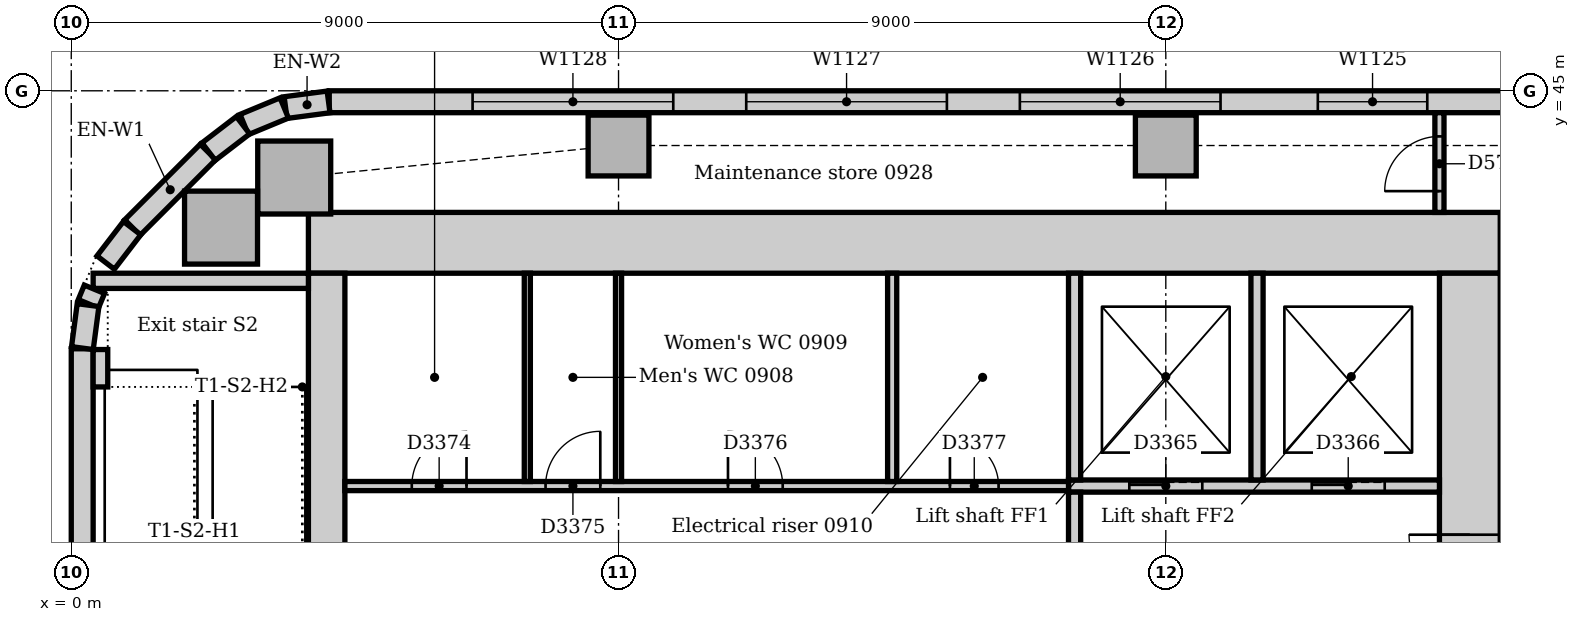
"""IFC4 building model, lengths in metres.
Left out: names, types, materials, properties, quantities, classifications, styles, units other than length and angle.
Written with IfcOpenShell. Run it as: python <this file> out.ifc"""

import sys

from ifc_helpers import new_model, si_unit, direction, frame, frame_2d, origin, origin_2d, place, context, subcontext, project, spatial, rectangle, extrude, element, fill, save


model = new_model("IFC4")
c1 = context("Model", 3, precision=1e-05, world=origin(), true_north=direction((0.0, 1.0)))
c2 = subcontext(c1, "Body", "Model", "MODEL_VIEW")
j1 = project(units=[si_unit("LENGTHUNIT", "METRE"), si_unit("PLANEANGLEUNIT", "RADIAN")], contexts=[c1])
p1 = place(None, origin())
s1 = spatial("IfcSite", under=j1, at=p1, CompositionType="ELEMENT")
p2 = place(p1, origin())
s2 = spatial("IfcBuilding", under=s1, at=p2, CompositionType="ELEMENT")
p3 = place(p2, frame((0.0, 0.0, 42.0)))
s3 = spatial("IfcBuildingStorey", under=s2, at=p3, CompositionType="ELEMENT", Elevation=42.0)
p4 = place(p3, frame((23.5, 42.5, 0.0), z_axis=(0.0, 0.0, 1.0), x_axis=(-1.0, 0.0, 0.0)))
e1 = element("IfcWall", 1, at=p4, inside=s3, PredefinedType="SOLIDWALL", context=c2, shape_type="SweptSolid", body=[
    extrude(rectangle(XDim=19.6, YDim=1.0, at=frame_2d((9.8, 0.0))), origin(), (0.0, 0.0, 1.0), 4.0),
])
p5 = place(p3, frame((23.0, 31.5, 0.0), z_axis=(0.0, 0.0, 1.0), x_axis=(0.0, 1.0, 0.0)))
e2 = element("IfcWall", 2, at=p5, inside=s3, PredefinedType="SOLIDWALL", context=c2, shape_type="SweptSolid", body=[
    extrude(rectangle(XDim=10.5, YDim=1.0, at=frame_2d((5.25, 0.0))), origin(), (0.0, 0.0, 1.0), 4.0),
])
p6 = place(p5, frame((3.15, 0.0, 0.0)))
e3 = element("IfcOpeningElement", 3, at=p6, cuts=e2, PredefinedType="OPENING", context=c2, shape_type="SweptSolid", body=[
    extrude(rectangle(XDim=1.0, YDim=2.1, at=frame_2d((0.5, 1.05))), frame((0.0, 0.51, 0.0), z_axis=(0.0, -1.0, 0.0), x_axis=(1.0, 0.0, 0.0)), (0.0, 0.0, 1.0), 1.02),
])
p7 = place(p5, frame((5.2, 0.0, 0.0)))
e4 = element("IfcOpeningElement", 4, at=p7, cuts=e2, PredefinedType="OPENING", context=c2, shape_type="SweptSolid", body=[
    extrude(rectangle(XDim=1.0, YDim=2.1, at=frame_2d((0.5, 1.05))), frame((0.0, 0.51, 0.0), z_axis=(0.0, -1.0, 0.0), x_axis=(1.0, 0.0, 0.0)), (0.0, 0.0, 1.0), 1.02),
])
p8 = place(p3, frame((4.2, 42.0, 0.0), z_axis=(0.0, 0.0, 1.0), x_axis=(0.0, -1.0, 0.0)))
e5 = element("IfcWall", 5, at=p8, inside=s3, PredefinedType="SOLIDWALL", context=c2, shape_type="SweptSolid", body=[
    extrude(rectangle(XDim=10.5, YDim=0.6, at=frame_2d((5.25, 0.0))), origin(), (0.0, 0.0, 1.0), 4.0),
])
p9 = place(p8, frame((5.3, 0.0, 0.0)))
e6 = element("IfcOpeningElement", 6, at=p9, cuts=e5, PredefinedType="OPENING", context=c2, shape_type="SweptSolid", body=[
    extrude(rectangle(XDim=1.0, YDim=2.1, at=frame_2d((0.5, 1.05))), frame((0.0, 0.31, 0.0), z_axis=(0.0, -1.0, 0.0), x_axis=(1.0, 0.0, 0.0)), (0.0, 0.0, 1.0), 0.62),
])
p10 = place(p3, frame((3.9, 41.875, 0.0), z_axis=(0.0, 0.0, 1.0), x_axis=(-1.0, 0.0, 0.0)))
e7 = element("IfcWall", 7, at=p10, inside=s3, PredefinedType="SOLIDWALL", context=c2, shape_type="SweptSolid", body=[
    extrude(rectangle(XDim=3.54, YDim=0.25, at=frame_2d((1.77, 0.0))), origin(), (0.0, 0.0, 1.0), 4.0),
])
for number, where, z_axis, x_axis in (
    (8, (3.667, 43.574, 0.0), (0.0, 0.0, 1.0), (1.0, 0.0, 0.0)),
    (9, (2.463, 42.75, 0.0), (0.0, 0.0, 1.0), (1.0, 0.0, 0.0)),
):
    element("IfcColumn", number, at=place(p3, frame(where, z_axis=z_axis, x_axis=x_axis)), inside=s3, PredefinedType="COLUMN", context=c2, shape_type="SweptSolid", body=[
        extrude(rectangle(XDim=1.2, YDim=1.2, at=origin_2d()), origin(), (0.0, 0.0, 1.0), 3.7),
    ])
for number, where, z_axis, x_axis in (
    (10, (9.0, 44.1, 0.0), (0.0, 0.0, 1.0), (1.0, 0.0, 0.0)),
    (11, (18.0, 44.1, 0.0), (0.0, 0.0, 1.0), (1.0, 0.0, 0.0)),
):
    element("IfcColumn", number, at=place(p3, frame(where, z_axis=z_axis, x_axis=x_axis)), inside=s3, PredefinedType="COLUMN", context=c2, shape_type="SweptSolid", body=[
        extrude(rectangle(XDim=1.0, YDim=1.0, at=origin_2d()), origin(), (0.0, 0.0, 1.0), 3.7),
    ])
p11 = place(p3, frame((48.257, 44.82, 0.0), z_axis=(0.0, 0.0, 1.0), x_axis=(-1.0, 0.0, 0.0)))
e12 = element("IfcWall", 12, at=p11, inside=s3, PredefinedType="STANDARD", context=c2, shape_type="SweptSolid", body=[
    extrude(rectangle(XDim=44.015, YDim=0.36, at=frame_2d((22.007, 0.0))), origin(), (0.0, 0.0, 1.0), 3.7),
])
p12 = place(p11, frame((2.057, 0.0, 0.9)))
e13 = element("IfcOpeningElement", 13, at=p12, cuts=e12, PredefinedType="OPENING", context=c2, shape_type="SweptSolid", body=[
    extrude(rectangle(XDim=3.3, YDim=1.6, at=frame_2d((1.65, 0.8))), frame((0.0, 0.19, 0.0), z_axis=(0.0, -1.0, 0.0), x_axis=(1.0, 0.0, 0.0)), (0.0, 0.0, 1.0), 0.38),
])
p13 = place(p11, frame((6.857, 0.0, 0.9)))
e14 = element("IfcOpeningElement", 14, at=p13, cuts=e12, PredefinedType="OPENING", context=c2, shape_type="SweptSolid", body=[
    extrude(rectangle(XDim=3.3, YDim=1.6, at=frame_2d((1.65, 0.8))), frame((0.0, 0.19, 0.0), z_axis=(0.0, -1.0, 0.0), x_axis=(1.0, 0.0, 0.0)), (0.0, 0.0, 1.0), 0.38),
])
p14 = place(p11, frame((11.357, 0.0, 0.9)))
e15 = element("IfcOpeningElement", 15, at=p14, cuts=e12, PredefinedType="OPENING", context=c2, shape_type="SweptSolid", body=[
    extrude(rectangle(XDim=3.3, YDim=1.6, at=frame_2d((1.65, 0.8))), frame((0.0, 0.19, 0.0), z_axis=(0.0, -1.0, 0.0), x_axis=(1.0, 0.0, 0.0)), (0.0, 0.0, 1.0), 0.38),
])
p15 = place(p11, frame((15.857, 0.0, 0.9)))
e16 = element("IfcOpeningElement", 16, at=p15, cuts=e12, PredefinedType="OPENING", context=c2, shape_type="SweptSolid", body=[
    extrude(rectangle(XDim=3.3, YDim=1.6, at=frame_2d((1.65, 0.8))), frame((0.0, 0.19, 0.0), z_axis=(0.0, -1.0, 0.0), x_axis=(1.0, 0.0, 0.0)), (0.0, 0.0, 1.0), 0.38),
])
p16 = place(p11, frame((20.357, 0.0, 0.9)))
e17 = element("IfcOpeningElement", 17, at=p16, cuts=e12, PredefinedType="OPENING", context=c2, shape_type="SweptSolid", body=[
    extrude(rectangle(XDim=3.3, YDim=1.6, at=frame_2d((1.65, 0.8))), frame((0.0, 0.19, 0.0), z_axis=(0.0, -1.0, 0.0), x_axis=(1.0, 0.0, 0.0)), (0.0, 0.0, 1.0), 0.38),
])
p17 = place(p11, frame((25.957, 0.0, 0.9)))
e18 = element("IfcOpeningElement", 18, at=p17, cuts=e12, PredefinedType="OPENING", context=c2, shape_type="SweptSolid", body=[
    extrude(rectangle(XDim=1.8, YDim=1.6, at=frame_2d((0.9, 0.8))), frame((0.0, 0.19, 0.0), z_axis=(0.0, -1.0, 0.0), x_axis=(1.0, 0.0, 0.0)), (0.0, 0.0, 1.0), 0.38),
])
p18 = place(p11, frame((29.357, 0.0, 0.9)))
e19 = element("IfcOpeningElement", 19, at=p18, cuts=e12, PredefinedType="OPENING", context=c2, shape_type="SweptSolid", body=[
    extrude(rectangle(XDim=3.3, YDim=1.6, at=frame_2d((1.65, 0.8))), frame((0.0, 0.19, 0.0), z_axis=(0.0, -1.0, 0.0), x_axis=(1.0, 0.0, 0.0)), (0.0, 0.0, 1.0), 0.38),
])
p19 = place(p11, frame((33.857, 0.0, 0.9)))
e20 = element("IfcOpeningElement", 20, at=p19, cuts=e12, PredefinedType="OPENING", context=c2, shape_type="SweptSolid", body=[
    extrude(rectangle(XDim=3.3, YDim=1.6, at=frame_2d((1.65, 0.8))), frame((0.0, 0.19, 0.0), z_axis=(0.0, -1.0, 0.0), x_axis=(1.0, 0.0, 0.0)), (0.0, 0.0, 1.0), 0.38),
])
p20 = place(p11, frame((38.357, 0.0, 0.9)))
e21 = element("IfcOpeningElement", 21, at=p20, cuts=e12, PredefinedType="OPENING", context=c2, shape_type="SweptSolid", body=[
    extrude(rectangle(XDim=3.3, YDim=1.6, at=frame_2d((1.65, 0.8))), frame((0.0, 0.19, 0.0), z_axis=(0.0, -1.0, 0.0), x_axis=(1.0, 0.0, 0.0)), (0.0, 0.0, 1.0), 0.38),
])
p21 = place(p3, frame((2.249, 43.994, 0.0), z_axis=(0.0, 0.0, 1.0), x_axis=(-0.707106781187, -0.707106781187, 0.0)))
e22 = element("IfcWall", 22, at=p21, inside=s3, PredefinedType="STANDARD", context=c2, shape_type="SweptSolid", body=[
    extrude(rectangle(XDim=1.757, YDim=0.36, at=frame_2d((0.879, 0.0))), origin(), (0.0, 0.0, 1.0), 3.7),
])
p22 = place(p3, frame((0.18, 40.757, 0.0), z_axis=(0.0, 0.0, 1.0), x_axis=(0.0, -1.0, 0.0)))
e23 = element("IfcWall", 23, at=p22, inside=s3, PredefinedType="STANDARD", context=c2, shape_type="SweptSolid", body=[
    extrude(rectangle(XDim=5.507, YDim=0.36, at=frame_2d((2.754, 0.0))), origin(), (0.0, 0.0, 1.0), 3.7),
])
for number, where, z_axis, x_axis in (
    (24, (4.231, 44.817, 0.0), (0.0, 0.0, 1.0), (-0.991, -0.131, 0.0)),
    (25, (3.503, 44.718, 0.0), (0.0, 0.0, 1.0), (-0.924, -0.383, 0.0)),
):
    element("IfcWall", number, at=place(p3, frame(where, z_axis=z_axis, x_axis=x_axis)), inside=s3, PredefinedType="STANDARD", context=c2, shape_type="SweptSolid", body=[
        extrude(rectangle(XDim=0.713, YDim=0.36, at=frame_2d((0.356, 0.0))), origin(), (0.0, 0.0, 1.0), 3.7),
    ])
for number, where, z_axis, x_axis in (
    (26, (2.825, 44.434, 0.0), (0.0, 0.0, 1.0), (-0.793, -0.609, 0.0)),
    (27, (1.0, 42.741, 0.0), (0.0, 0.0, 1.0), (-0.609, -0.793, 0.0)),
):
    element("IfcWall", number, at=place(p3, frame(where, z_axis=z_axis, x_axis=x_axis)), inside=s3, PredefinedType="STANDARD", context=c2, shape_type="SweptSolid", body=[
        extrude(rectangle(XDim=0.713, YDim=0.36, at=frame_2d((0.357, 0.0))), origin(), (0.0, 0.0, 1.0), 3.7),
    ])
p23 = place(p3, frame((0.381, 41.736, 0.0), z_axis=(0.0, 0.0, 1.0), x_axis=(-0.382773360986, -0.923842277729, 0.0)))
e28 = element("IfcWall", 28, at=p23, inside=s3, PredefinedType="STANDARD", context=c2, shape_type="SweptSolid", body=[
    extrude(rectangle(XDim=0.258, YDim=0.36, at=frame_2d((0.129, 0.0))), origin(), (0.0, 0.0, 1.0), 3.7),
])
p24 = place(p3, frame((0.276, 41.476, 0.0), z_axis=(0.0, 0.0, 1.0), x_axis=(-0.13055608231, -0.99144092581, 0.0)))
e29 = element("IfcWall", 29, at=p24, inside=s3, PredefinedType="STANDARD", context=c2, shape_type="SweptSolid", body=[
    extrude(rectangle(XDim=0.713, YDim=0.36, at=frame_2d((0.356, 0.0))), origin(), (0.0, 0.0, 1.0), 3.7),
])
p25 = place(p3, frame((0.48, 40.13, 0.0), z_axis=(0.0, 0.0, 1.0), x_axis=(0.0, 1.0, 0.0)))
e30 = element("IfcWall", 30, at=p25, inside=s3, PredefinedType="STANDARD", context=c2, shape_type="SweptSolid", body=[
    extrude(rectangle(XDim=0.615, YDim=0.24, at=frame_2d((0.307, 0.0))), origin(), (0.0, 0.0, 1.0), 4.0),
])
p26 = place(p3, frame((16.4, 38.5, 0.0), z_axis=(0.0, 0.0, 1.0), x_axis=(1.0, 0.0, 0.0)))
e31 = element("IfcWall", 31, at=p26, inside=s3, PredefinedType="PARTITIONING", context=c2, shape_type="SweptSolid", body=[
    extrude(rectangle(XDim=6.1, YDim=0.2, at=frame_2d((3.05, 0.0))), origin(), (0.0, 0.0, 1.0), 3.7),
])
p27 = place(p26, frame((1.0, 0.0, 0.0)))
e32 = element("IfcOpeningElement", 32, at=p27, cuts=e31, PredefinedType="OPENING", context=c2, shape_type="SweptSolid", body=[
    extrude(rectangle(XDim=1.2, YDim=2.1, at=frame_2d((0.6, 1.05))), frame((0.0, 0.11, 0.0), z_axis=(0.0, -1.0, 0.0), x_axis=(1.0, 0.0, 0.0)), (0.0, 0.0, 1.0), 0.22),
])
p28 = place(p26, frame((4.0, 0.0, 0.0)))
e33 = element("IfcOpeningElement", 33, at=p28, cuts=e31, PredefinedType="OPENING", context=c2, shape_type="SweptSolid", body=[
    extrude(rectangle(XDim=1.2, YDim=2.1, at=frame_2d((0.6, 1.05))), frame((0.0, 0.11, 0.0), z_axis=(0.0, -1.0, 0.0), x_axis=(1.0, 0.0, 0.0)), (0.0, 0.0, 1.0), 0.22),
])
p29 = place(p3, frame((16.5, 35.85, 0.0), z_axis=(0.0, 0.0, 1.0), x_axis=(0.0, 1.0, 0.0)))
e34 = element("IfcWall", 34, at=p29, inside=s3, PredefinedType="PARTITIONING", context=c2, shape_type="SweptSolid", body=[
    extrude(rectangle(XDim=2.55, YDim=0.2, at=frame_2d((1.275, 0.0))), origin(), (0.0, 0.0, 1.0), 3.7),
])
for number, where, z_axis, x_axis in (
    (35, (16.5, 38.6, 0.0), (0.0, 0.0, 1.0), (0.0, 1.0, 0.0)),
    (36, (19.5, 38.6, 0.0), (0.0, 0.0, 1.0), (0.0, 1.0, 0.0)),
):
    element("IfcWall", number, at=place(p3, frame(where, z_axis=z_axis, x_axis=x_axis)), inside=s3, PredefinedType="PARTITIONING", context=c2, shape_type="SweptSolid", body=[
        extrude(rectangle(XDim=3.4, YDim=0.2, at=frame_2d((1.7, 0.0))), origin(), (0.0, 0.0, 1.0), 3.7),
    ])
p30 = place(p3, frame((4.5, 38.5, 0.0), z_axis=(0.0, 0.0, 1.0), x_axis=(1.0, 0.0, 0.0)))
e37 = element("IfcWall", 37, at=p30, inside=s3, PredefinedType="PARTITIONING", context=c2, shape_type="SweptSolid", body=[
    extrude(rectangle(XDim=11.9, YDim=0.15, at=frame_2d((5.95, 0.0))), origin(), (0.0, 0.0, 1.0), 3.7),
])
p31 = place(p30, frame((1.1, 0.0, 0.0)))
e38 = element("IfcOpeningElement", 38, at=p31, cuts=e37, PredefinedType="OPENING", context=c2, shape_type="SweptSolid", body=[
    extrude(rectangle(XDim=0.9, YDim=2.1, at=frame_2d((0.45, 1.05))), frame((0.0, 0.085, 0.0), z_axis=(0.0, -1.0, 0.0), x_axis=(1.0, 0.0, 0.0)), (0.0, 0.0, 1.0), 0.17),
])
p32 = place(p30, frame((3.3, 0.0, 0.0)))
e39 = element("IfcOpeningElement", 39, at=p32, cuts=e37, PredefinedType="OPENING", context=c2, shape_type="SweptSolid", body=[
    extrude(rectangle(XDim=0.9, YDim=2.1, at=frame_2d((0.45, 1.05))), frame((0.0, 0.085, 0.0), z_axis=(0.0, -1.0, 0.0), x_axis=(1.0, 0.0, 0.0)), (0.0, 0.0, 1.0), 0.17),
])
p33 = place(p30, frame((6.3, 0.0, 0.0)))
e40 = element("IfcOpeningElement", 40, at=p33, cuts=e37, PredefinedType="OPENING", context=c2, shape_type="SweptSolid", body=[
    extrude(rectangle(XDim=0.9, YDim=2.1, at=frame_2d((0.45, 1.05))), frame((0.0, 0.085, 0.0), z_axis=(0.0, -1.0, 0.0), x_axis=(1.0, 0.0, 0.0)), (0.0, 0.0, 1.0), 0.17),
])
p34 = place(p30, frame((9.95, 0.0, 0.0)))
e41 = element("IfcOpeningElement", 41, at=p34, cuts=e37, PredefinedType="OPENING", context=c2, shape_type="SweptSolid", body=[
    extrude(rectangle(XDim=0.8, YDim=2.1, at=frame_2d((0.4, 1.05))), frame((0.0, 0.085, 0.0), z_axis=(0.0, -1.0, 0.0), x_axis=(1.0, 0.0, 0.0)), (0.0, 0.0, 1.0), 0.17),
])
p35 = place(p3, frame((22.5, 43.0, 0.0), z_axis=(0.0, 0.0, 1.0), x_axis=(0.0, 1.0, 0.0)))
e42 = element("IfcWall", 42, at=p35, inside=s3, PredefinedType="PARTITIONING", context=c2, shape_type="SweptSolid", body=[
    extrude(rectangle(XDim=1.64, YDim=0.15, at=frame_2d((0.82, 0.0))), origin(), (0.0, 0.0, 1.0), 3.7),
])
p36 = place(p35, frame((0.35, 0.0, 0.0)))
e43 = element("IfcOpeningElement", 43, at=p36, cuts=e42, PredefinedType="OPENING", context=c2, shape_type="SweptSolid", body=[
    extrude(rectangle(XDim=0.9, YDim=2.1, at=frame_2d((0.45, 1.05))), frame((0.0, 0.085, 0.0), z_axis=(0.0, -1.0, 0.0), x_axis=(1.0, 0.0, 0.0)), (0.0, 0.0, 1.0), 0.17),
])
p37 = place(p3, frame((13.5, 38.575, 0.0), z_axis=(0.0, 0.0, 1.0), x_axis=(0.0, 1.0, 0.0)))
e44 = element("IfcWall", 44, at=p37, inside=s3, PredefinedType="PARTITIONING", context=c2, shape_type="SweptSolid", body=[
    extrude(rectangle(XDim=3.425, YDim=0.15, at=frame_2d((1.712, 0.0))), origin(), (0.0, 0.0, 1.0), 3.7),
])
for number, where, z_axis, x_axis in (
    (45, (7.5, 38.575, 0.0), (0.0, 0.0, 1.0), (0.0, 1.0, 0.0)),
    (46, (9.0, 38.575, 0.0), (0.0, 0.0, 1.0), (0.0, 1.0, 0.0)),
):
    element("IfcWall", number, at=place(p3, frame(where, z_axis=z_axis, x_axis=x_axis)), inside=s3, PredefinedType="PARTITIONING", context=c2, shape_type="SweptSolid", body=[
        extrude(rectangle(XDim=3.425, YDim=0.1, at=frame_2d((1.712, 0.0))), origin(), (0.0, 0.0, 1.0), 3.7),
    ])
p38 = place(p17, origin())
e47 = element("IfcWindow", 47, at=p38, inside=s3, PartitioningType="SINGLE_PANEL", PredefinedType="WINDOW", context=c2, shape_type="SweptSolid", body=[
    extrude(rectangle(XDim=1.8, YDim=1.6, at=frame_2d((0.9, 0.8))), frame((0.0, 0.13, 0.0), z_axis=(0.0, -1.0, 0.0), x_axis=(1.0, 0.0, 0.0)), (0.0, 0.0, 1.0), 0.06),
])
fill(e18, e47)
p39 = place(p18, origin())
e48 = element("IfcWindow", 48, at=p39, inside=s3, PartitioningType="SINGLE_PANEL", PredefinedType="WINDOW", context=c2, shape_type="SweptSolid", body=[
    extrude(rectangle(XDim=3.3, YDim=1.6, at=frame_2d((1.65, 0.8))), frame((0.0, 0.13, 0.0), z_axis=(0.0, -1.0, 0.0), x_axis=(1.0, 0.0, 0.0)), (0.0, 0.0, 1.0), 0.06),
])
fill(e19, e48)
p40 = place(p19, origin())
e49 = element("IfcWindow", 49, at=p40, inside=s3, PartitioningType="SINGLE_PANEL", PredefinedType="WINDOW", context=c2, shape_type="SweptSolid", body=[
    extrude(rectangle(XDim=3.3, YDim=1.6, at=frame_2d((1.65, 0.8))), frame((0.0, 0.13, 0.0), z_axis=(0.0, -1.0, 0.0), x_axis=(1.0, 0.0, 0.0)), (0.0, 0.0, 1.0), 0.06),
])
fill(e20, e49)
p41 = place(p20, origin())
e50 = element("IfcWindow", 50, at=p41, inside=s3, PartitioningType="SINGLE_PANEL", PredefinedType="WINDOW", context=c2, shape_type="SweptSolid", body=[
    extrude(rectangle(XDim=3.3, YDim=1.6, at=frame_2d((1.65, 0.8))), frame((0.0, 0.13, 0.0), z_axis=(0.0, -1.0, 0.0), x_axis=(1.0, 0.0, 0.0)), (0.0, 0.0, 1.0), 0.06),
])
fill(e21, e50)
p42 = place(p27, origin())
e51 = element("IfcDoor", 51, at=p42, inside=s3, OperationType="SLIDING_TO_LEFT", PredefinedType="DOOR", context=c2, shape_type="SweptSolid", body=[
    extrude(rectangle(XDim=1.2, YDim=2.1, at=frame_2d((0.6, 1.05))), frame((0.0, 0.025, 0.0), z_axis=(0.0, -1.0, 0.0), x_axis=(1.0, 0.0, 0.0)), (0.0, 0.0, 1.0), 0.05),
])
fill(e32, e51)
p43 = place(p28, origin())
e52 = element("IfcDoor", 52, at=p43, inside=s3, OperationType="SLIDING_TO_LEFT", PredefinedType="DOOR", context=c2, shape_type="SweptSolid", body=[
    extrude(rectangle(XDim=1.2, YDim=2.1, at=frame_2d((0.6, 1.05))), frame((0.0, 0.025, 0.0), z_axis=(0.0, -1.0, 0.0), x_axis=(1.0, 0.0, 0.0)), (0.0, 0.0, 1.0), 0.05),
])
fill(e33, e52)
p44 = place(p7, origin())
e53 = element("IfcDoor", 53, at=p44, inside=s3, OperationType="SINGLE_SWING_RIGHT", PredefinedType="DOOR", context=c2, shape_type="SweptSolid", body=[
    extrude(rectangle(XDim=1.0, YDim=2.1, at=frame_2d((0.5, 1.05))), frame((0.0, 0.025, 0.0), z_axis=(0.0, -1.0, 0.0), x_axis=(1.0, 0.0, 0.0)), (0.0, 0.0, 1.0), 0.05),
])
fill(e4, e53)
p45 = place(p31, origin())
e54 = element("IfcDoor", 54, at=p45, inside=s3, OperationType="SINGLE_SWING_RIGHT", PredefinedType="DOOR", context=c2, shape_type="SweptSolid", body=[
    extrude(rectangle(XDim=0.9, YDim=2.1, at=frame_2d((0.45, 1.05))), frame((0.0, 0.025, 0.0), z_axis=(0.0, -1.0, 0.0), x_axis=(1.0, 0.0, 0.0)), (0.0, 0.0, 1.0), 0.05),
])
fill(e38, e54)
p46 = place(p32, origin())
e55 = element("IfcDoor", 55, at=p46, inside=s3, OperationType="SINGLE_SWING_RIGHT", PredefinedType="DOOR", context=c2, shape_type="SweptSolid", body=[
    extrude(rectangle(XDim=0.9, YDim=2.1, at=frame_2d((0.45, 1.05))), frame((0.0, 0.025, 0.0), z_axis=(0.0, -1.0, 0.0), x_axis=(1.0, 0.0, 0.0)), (0.0, 0.0, 1.0), 0.05),
])
fill(e39, e55)
p47 = place(p33, origin())
e56 = element("IfcDoor", 56, at=p47, inside=s3, OperationType="SINGLE_SWING_LEFT", PredefinedType="DOOR", context=c2, shape_type="SweptSolid", body=[
    extrude(rectangle(XDim=0.9, YDim=2.1, at=frame_2d((0.45, 1.05))), frame((0.0, 0.025, 0.0), z_axis=(0.0, -1.0, 0.0), x_axis=(1.0, 0.0, 0.0)), (0.0, 0.0, 1.0), 0.05),
])
fill(e40, e56)
p48 = place(p34, origin())
e57 = element("IfcDoor", 57, at=p48, inside=s3, OperationType="SINGLE_SWING_LEFT", PredefinedType="DOOR", context=c2, shape_type="SweptSolid", body=[
    extrude(rectangle(XDim=0.8, YDim=2.1, at=frame_2d((0.4, 1.05))), frame((0.0, 0.025, 0.0), z_axis=(0.0, -1.0, 0.0), x_axis=(1.0, 0.0, 0.0)), (0.0, 0.0, 1.0), 0.05),
])
fill(e41, e57)
p49 = place(p36, origin())
e58 = element("IfcDoor", 58, at=p49, inside=s3, OperationType="SINGLE_SWING_LEFT", PredefinedType="DOOR", context=c2, shape_type="SweptSolid", body=[
    extrude(rectangle(XDim=0.9, YDim=2.1, at=frame_2d((0.45, 1.05))), frame((0.0, 0.025, 0.0), z_axis=(0.0, -1.0, 0.0), x_axis=(1.0, 0.0, 0.0)), (0.0, 0.0, 1.0), 0.05),
])
fill(e43, e58)
save(model, sys.argv[1])
